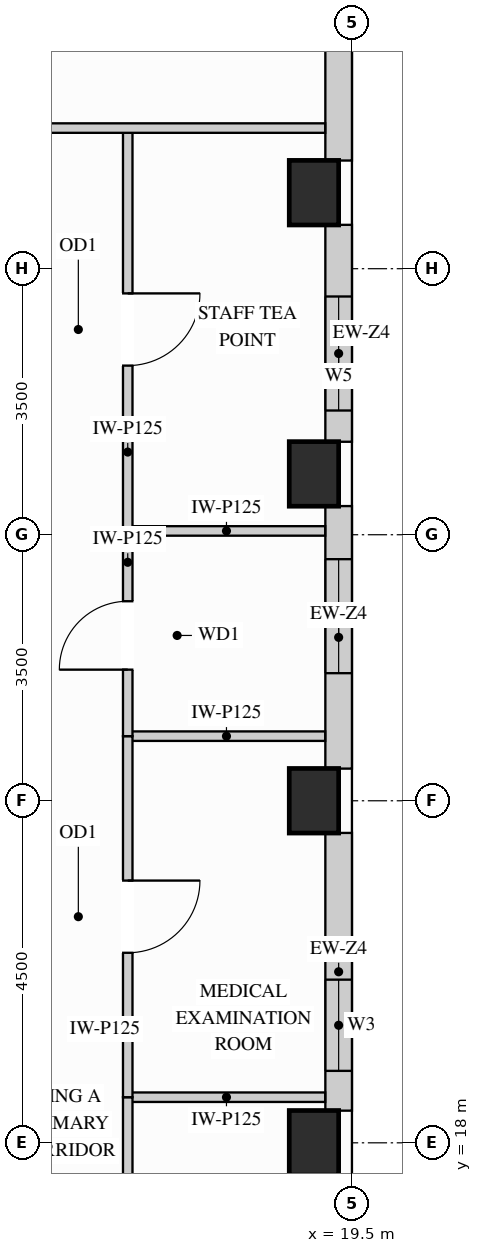
"""IFC4 building model, lengths in metres.
Left out: names, types, materials, properties, quantities, classifications, styles, units other than length and angle.
Written with IfcOpenShell. Run it as: python <this file> out.ifc"""

import sys

from ifc_helpers import new_model, si_unit, direction, frame, frame_2d, origin, origin_2d, place, context, subcontext, project, spatial, rectangle, extrude, source, transform, mapped, element, fill, save


model = new_model("IFC4")
c1 = context("Model", 3, precision=1e-05, world=origin(), true_north=direction((0.0, 1.0)))
c2 = subcontext(c1, "Body", "Model", "MODEL_VIEW")
j1 = project(units=[si_unit("LENGTHUNIT", "METRE"), si_unit("PLANEANGLEUNIT", "RADIAN")], contexts=[c1])
p1 = place(None, origin())
s1 = spatial("IfcSite", under=j1, at=p1, CompositionType="ELEMENT")
p2 = place(p1, origin())
s2 = spatial("IfcBuilding", under=s1, at=p2, CompositionType="ELEMENT")
p3 = place(p2, frame((0.0, 0.0, 248.4)))
s3 = spatial("IfcBuildingStorey", under=s2, at=p3, CompositionType="ELEMENT", Elevation=248.4)
m1 = source(origin(), c2, "Body", "SweptSolid", [
    extrude(rectangle(XDim=0.65, YDim=0.85, at=origin_2d()), origin(), (0.0, 0.0, 1.0), 3.4),
])
for number, where, z_axis, x_axis in (
    (1, (19.0, 18.0, 0.0), (0.0, 0.0, 1.0), (1.0, 0.0, 0.0)),
    (2, (19.0, 22.5, 0.0), (0.0, 0.0, 1.0), (1.0, 0.0, 0.0)),
    (3, (19.0, 26.8, 0.0), (0.0, 0.0, 1.0), (1.0, 0.0, 0.0)),
    (4, (19.0, 30.5, 0.0), (0.0, 0.0, 1.0), (1.0, 0.0, 0.0)),
):
    element("IfcColumn", number, at=place(p3, frame(where, z_axis=z_axis, x_axis=x_axis)), inside=s3, PredefinedType="COLUMN", context=c2, shape_type="MappedRepresentation", body=[
        mapped(m1, transform((0.0, 0.0, 0.0), x_axis=(1.0, 0.0, 0.0), y_axis=(0.0, 1.0, 0.0), z_axis=(0.0, 0.0, 1.0))),
    ])
p4 = place(p3, frame((19.325, 18.423, 0.0), z_axis=(0.0, 0.0, 1.0), x_axis=(0.0, 1.0, 0.0)))
e5 = element("IfcWall", 5, at=p4, inside=s3, PredefinedType="SOLIDWALL", context=c2, shape_type="SweptSolid", body=[
    extrude(rectangle(XDim=3.654, YDim=0.35, at=frame_2d((1.827, 0.0))), origin(), (0.0, 0.0, 1.0), 2.619),
])
p5 = place(p4, frame((0.523, 0.0, 0.78)))
e6 = element("IfcOpeningElement", 6, at=p5, cuts=e5, PredefinedType="OPENING", context=c2, shape_type="SweptSolid", body=[
    extrude(rectangle(XDim=1.2, YDim=1.659, at=frame_2d((0.6, 0.83))), frame((0.0, 0.185, 0.0), z_axis=(0.0, -1.0, 0.0), x_axis=(1.0, 0.0, 0.0)), (0.0, 0.0, 1.0), 0.37),
])
p6 = place(p3, frame((19.325, 22.923, 0.0), z_axis=(0.0, 0.0, 1.0), x_axis=(0.0, 1.0, 0.0)))
e7 = element("IfcWall", 7, at=p6, inside=s3, PredefinedType="SOLIDWALL", context=c2, shape_type="SweptSolid", body=[
    extrude(rectangle(XDim=3.454, YDim=0.35, at=frame_2d((1.727, 0.0))), origin(), (0.0, 0.0, 1.0), 2.619),
])
p7 = place(p6, frame((1.256, 0.0, 0.78)))
e8 = element("IfcOpeningElement", 8, at=p7, cuts=e7, PredefinedType="OPENING", context=c2, shape_type="SweptSolid", body=[
    extrude(rectangle(XDim=1.5, YDim=1.659, at=frame_2d((0.75, 0.83))), frame((0.0, 0.185, 0.0), z_axis=(0.0, -1.0, 0.0), x_axis=(1.0, 0.0, 0.0)), (0.0, 0.0, 1.0), 0.37),
])
p8 = place(p3, frame((19.325, 27.223, 0.0), z_axis=(0.0, 0.0, 1.0), x_axis=(0.0, 1.0, 0.0)))
e9 = element("IfcWall", 9, at=p8, inside=s3, PredefinedType="SOLIDWALL", context=c2, shape_type="SweptSolid", body=[
    extrude(rectangle(XDim=2.854, YDim=0.35, at=frame_2d((1.427, 0.0))), origin(), (0.0, 0.0, 1.0), 2.619),
])
p9 = place(p8, frame((0.411, 0.0, 0.78)))
e10 = element("IfcOpeningElement", 10, at=p9, cuts=e9, PredefinedType="OPENING", context=c2, shape_type="SweptSolid", body=[
    extrude(rectangle(XDim=1.5, YDim=1.659, at=frame_2d((0.75, 0.83))), frame((0.0, 0.185, 0.0), z_axis=(0.0, -1.0, 0.0), x_axis=(1.0, 0.0, 0.0)), (0.0, 0.0, 1.0), 0.37),
])
m2 = source(origin(), c2, "Body", "SweptSolid", [
    extrude(rectangle(XDim=3.654, YDim=0.35, at=frame_2d((1.827, 0.0))), origin(), (0.0, 0.0, 1.0), 2.619),
])
p10 = place(p3, frame((19.325, 30.923, 0.0), z_axis=(0.0, 0.0, 1.0), x_axis=(0.0, 1.0, 0.0)))
e11 = element("IfcWall", 11, at=p10, inside=s3, PredefinedType="SOLIDWALL", context=c2, shape_type="MappedRepresentation", body=[
    mapped(m2, transform((0.0, 0.0, 0.0), x_axis=(1.0, 0.0, 0.0), y_axis=(0.0, 1.0, 0.0), z_axis=(0.0, 0.0, 1.0))),
])
m3 = source(origin(), c2, "Body", "SweptSolid", [
    extrude(rectangle(XDim=2.598, YDim=0.125, at=frame_2d((1.299, 0.0))), origin(), (0.0, 0.0, 1.0), 3.385),
])
for number, where, z_axis, x_axis in (
    (12, (16.55, 18.6, 0.0), (0.0, 0.0, 1.0), (1.0, 0.0, 0.0)),
    (13, (16.55, 23.35, 0.0), (0.0, 0.0, 1.0), (1.0, 0.0, 0.0)),
    (14, (16.55, 26.05, 0.0), (0.0, 0.0, 1.0), (1.0, 0.0, 0.0)),
):
    element("IfcWall", number, at=place(p3, frame(where, z_axis=z_axis, x_axis=x_axis)), inside=s3, PredefinedType="PARTITIONING", context=c2, shape_type="MappedRepresentation", body=[
        mapped(m3, transform((0.0, 0.0, 0.0), x_axis=(1.0, 0.0, 0.0), y_axis=(0.0, 1.0, 0.0), z_axis=(0.0, 0.0, 1.0))),
    ])
p11 = place(p3, frame((16.55, 12.35, 0.0), z_axis=(0.0, 0.0, 1.0), x_axis=(0.0, 1.0, 0.0)))
e15 = element("IfcWall", 15, at=p11, inside=s3, PredefinedType="PARTITIONING", context=c2, shape_type="SweptSolid", body=[
    extrude(rectangle(XDim=6.25, YDim=0.125, at=frame_2d((3.125, 0.0))), origin(), (0.0, 0.0, 1.0), 3.385),
])
p12 = place(p11, frame((2.65, 0.0, 0.0)))
e16 = element("IfcOpeningElement", 16, at=p12, cuts=e15, PredefinedType="OPENING", context=c2, shape_type="SweptSolid", body=[
    extrude(rectangle(XDim=0.95, YDim=2.15, at=frame_2d((0.475, 1.075))), frame((0.0, 0.073, 0.0), z_axis=(0.0, -1.0, 0.0), x_axis=(1.0, 0.0, 0.0)), (0.0, 0.0, 1.0), 0.145),
])
p13 = place(p3, frame((16.55, 18.6, 0.0), z_axis=(0.0, 0.0, 1.0), x_axis=(0.0, 1.0, 0.0)))
e17 = element("IfcWall", 17, at=p13, inside=s3, PredefinedType="PARTITIONING", context=c2, shape_type="SweptSolid", body=[
    extrude(rectangle(XDim=4.75, YDim=0.125, at=frame_2d((2.375, 0.0))), origin(), (0.0, 0.0, 1.0), 3.385),
])
p14 = place(p13, frame((1.9, 0.0, 0.0)))
e18 = element("IfcOpeningElement", 18, at=p14, cuts=e17, PredefinedType="OPENING", context=c2, shape_type="SweptSolid", body=[
    extrude(rectangle(XDim=0.95, YDim=2.15, at=frame_2d((0.475, 1.075))), frame((0.0, 0.073, 0.0), z_axis=(0.0, -1.0, 0.0), x_axis=(1.0, 0.0, 0.0)), (0.0, 0.0, 1.0), 0.145),
])
p15 = place(p3, frame((16.55, 26.05, 0.0), z_axis=(0.0, 0.0, 1.0), x_axis=(0.0, 1.0, 0.0)))
e19 = element("IfcWall", 19, at=p15, inside=s3, PredefinedType="PARTITIONING", context=c2, shape_type="SweptSolid", body=[
    extrude(rectangle(XDim=5.3, YDim=0.125, at=frame_2d((2.65, 0.0))), origin(), (0.0, 0.0, 1.0), 3.385),
])
p16 = place(p15, frame((2.175, 0.0, 0.0)))
e20 = element("IfcOpeningElement", 20, at=p16, cuts=e19, PredefinedType="OPENING", context=c2, shape_type="SweptSolid", body=[
    extrude(rectangle(XDim=0.95, YDim=2.15, at=frame_2d((0.475, 1.075))), frame((0.0, 0.073, 0.0), z_axis=(0.0, -1.0, 0.0), x_axis=(1.0, 0.0, 0.0)), (0.0, 0.0, 1.0), 0.145),
])
p17 = place(p3, frame((16.55, 23.35, 0.0), z_axis=(0.0, 0.0, 1.0), x_axis=(0.0, 1.0, 0.0)))
e21 = element("IfcWall", 21, at=p17, inside=s3, PredefinedType="PARTITIONING", context=c2, shape_type="SweptSolid", body=[
    extrude(rectangle(XDim=2.7, YDim=0.125, at=frame_2d((1.35, 0.0))), origin(), (0.0, 0.0, 1.0), 3.385),
])
p18 = place(p17, frame((0.875, 0.0, 0.0)))
e22 = element("IfcOpeningElement", 22, at=p18, cuts=e21, PredefinedType="OPENING", context=c2, shape_type="SweptSolid", body=[
    extrude(rectangle(XDim=0.9, YDim=2.15, at=frame_2d((0.45, 1.075))), frame((0.0, 0.073, 0.0), z_axis=(0.0, -1.0, 0.0), x_axis=(1.0, 0.0, 0.0)), (0.0, 0.0, 1.0), 0.145),
])
m4 = source(origin(), c2, "Body", "SweptSolid", [
    extrude(rectangle(XDim=7.498, YDim=0.125, at=frame_2d((3.749, 0.0))), origin(), (0.0, 0.0, 1.0), 3.385),
])
p19 = place(p3, frame((11.65, 31.35, 0.0), z_axis=(0.0, 0.0, 1.0), x_axis=(1.0, 0.0, 0.0)))
e23 = element("IfcWall", 23, at=p19, inside=s3, PredefinedType="PARTITIONING", context=c2, shape_type="MappedRepresentation", body=[
    mapped(m4, transform((0.0, 0.0, 0.0), x_axis=(1.0, 0.0, 0.0), y_axis=(0.0, 1.0, 0.0), z_axis=(0.0, 0.0, 1.0))),
])
m5 = source(origin(), c2, "Body", "SweptSolid", [
    extrude(rectangle(XDim=0.95, YDim=2.15, at=frame_2d((0.475, 1.075))), frame((0.0, 0.025, 0.0), z_axis=(0.0, -1.0, 0.0), x_axis=(1.0, 0.0, 0.0)), (0.0, 0.0, 1.0), 0.05),
])
p20 = place(p14, origin())
e24 = element("IfcDoor", 24, at=p20, inside=s3, OperationType="SINGLE_SWING_RIGHT", PredefinedType="DOOR", context=c2, shape_type="MappedRepresentation", body=[
    mapped(m5, transform((0.0, 0.0, 0.0), x_axis=(1.0, 0.0, 0.0), y_axis=(0.0, 1.0, 0.0), z_axis=(0.0, 0.0, 1.0))),
])
fill(e18, e24)
p21 = place(p16, origin())
e25 = element("IfcDoor", 25, at=p21, inside=s3, OperationType="SINGLE_SWING_RIGHT", PredefinedType="DOOR", context=c2, shape_type="MappedRepresentation", body=[
    mapped(m5, transform((0.0, 0.0, 0.0), x_axis=(1.0, 0.0, 0.0), y_axis=(0.0, 1.0, 0.0), z_axis=(0.0, 0.0, 1.0))),
])
fill(e20, e25)
m6 = source(origin(), c2, "Body", "SweptSolid", [
    extrude(rectangle(XDim=0.9, YDim=2.15, at=frame_2d((0.45, 1.075))), frame((0.0, 0.025, 0.0), z_axis=(0.0, -1.0, 0.0), x_axis=(1.0, 0.0, 0.0)), (0.0, 0.0, 1.0), 0.05),
])
p22 = place(p18, origin())
e26 = element("IfcDoor", 26, at=p22, inside=s3, OperationType="SINGLE_SWING_LEFT", PredefinedType="DOOR", context=c2, shape_type="MappedRepresentation", body=[
    mapped(m6, transform((0.0, 0.0, 0.0), x_axis=(1.0, 0.0, 0.0), y_axis=(0.0, 1.0, 0.0), z_axis=(0.0, 0.0, 1.0))),
])
fill(e22, e26)
m7 = source(origin(), c2, "Body", "SweptSolid", [
    extrude(rectangle(XDim=1.2, YDim=1.659, at=frame_2d((0.6, 0.83))), frame((0.0, 0.03, 0.0), z_axis=(0.0, -1.0, 0.0), x_axis=(1.0, 0.0, 0.0)), (0.0, 0.0, 1.0), 0.06),
])
p23 = place(p5, origin())
e27 = element("IfcWindow", 27, at=p23, inside=s3, PartitioningType="SINGLE_PANEL", PredefinedType="WINDOW", context=c2, shape_type="MappedRepresentation", body=[
    mapped(m7, transform((0.0, 0.0, 0.0), x_axis=(1.0, 0.0, 0.0), y_axis=(0.0, 1.0, 0.0), z_axis=(0.0, 0.0, 1.0))),
])
fill(e6, e27)
m8 = source(origin(), c2, "Body", "SweptSolid", [
    extrude(rectangle(XDim=1.5, YDim=1.659, at=frame_2d((0.75, 0.83))), frame((0.0, 0.03, 0.0), z_axis=(0.0, -1.0, 0.0), x_axis=(1.0, 0.0, 0.0)), (0.0, 0.0, 1.0), 0.06),
])
p24 = place(p7, origin())
e28 = element("IfcWindow", 28, at=p24, inside=s3, PartitioningType="SINGLE_PANEL", PredefinedType="WINDOW", context=c2, shape_type="MappedRepresentation", body=[
    mapped(m8, transform((0.0, 0.0, 0.0), x_axis=(1.0, 0.0, 0.0), y_axis=(0.0, 1.0, 0.0), z_axis=(0.0, 0.0, 1.0))),
])
fill(e8, e28)
p25 = place(p9, origin())
e29 = element("IfcWindow", 29, at=p25, inside=s3, PartitioningType="SINGLE_PANEL", PredefinedType="WINDOW", context=c2, shape_type="MappedRepresentation", body=[
    mapped(m8, transform((0.0, 0.0, 0.0), x_axis=(1.0, 0.0, 0.0), y_axis=(0.0, 1.0, 0.0), z_axis=(0.0, 0.0, 1.0))),
])
fill(e10, e29)
save(model, sys.argv[1])
